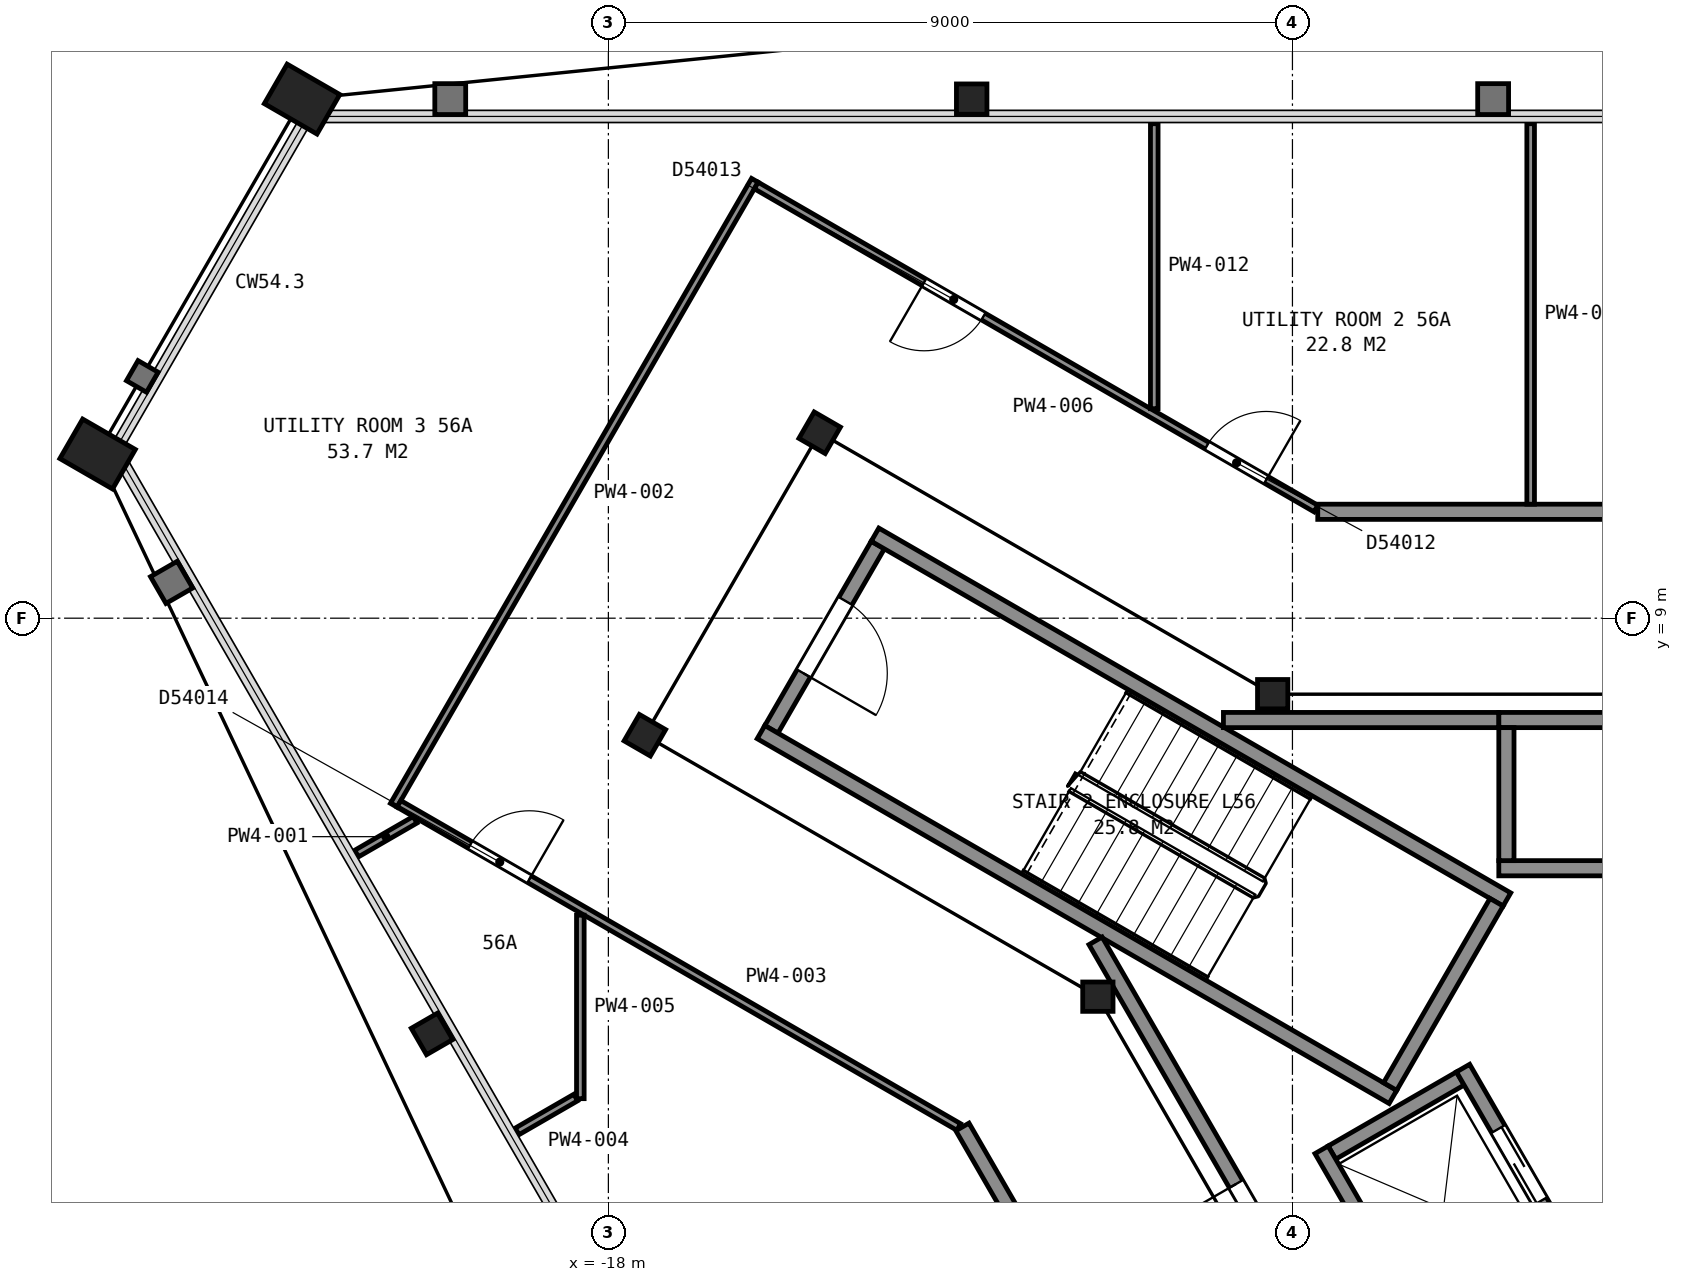
"""IFC4 building model, lengths in metres.
Left out: names, types, materials, properties, quantities, classifications, styles, units other than length and angle.
Written with IfcOpenShell. Run it as: python <this file> out.ifc"""

import sys

from ifc_helpers import new_model, si_unit, direction, frame, frame_2d, origin, origin_2d, place, context, subcontext, project, spatial, rectangle, hollow_rectangle, i_section, extrude, element, fill, save


model = new_model("IFC4")
c1 = context("Model", 3, precision=1e-05, world=origin(), true_north=direction((0.0, 1.0)))
c2 = subcontext(c1, "Body", "Model", "MODEL_VIEW")
j1 = project(units=[si_unit("LENGTHUNIT", "METRE"), si_unit("PLANEANGLEUNIT", "RADIAN")], contexts=[c1])
p1 = place(None, origin())
s1 = spatial("IfcSite", under=j1, at=p1, CompositionType="ELEMENT")
p2 = place(p1, origin())
s2 = spatial("IfcBuilding", under=s1, at=p2, CompositionType="ELEMENT")
p3 = place(p2, frame((0.0, 0.0, 224.9)))
s3 = spatial("IfcBuildingStorey", under=s2, at=p3, CompositionType="ELEMENT", Elevation=224.9)
p4 = place(p3, frame((-13.22, 15.83, 0.0), z_axis=(0.0, 0.0, 1.0), x_axis=(1.0, 0.0, 0.0)))
e1 = element("IfcColumn", 1, at=p4, inside=s3, PredefinedType="COLUMN", context=c2, shape_type="SweptSolid", body=[
    extrude(i_section(OverallWidth=0.401, OverallDepth=0.399, WebThickness=0.025, FlangeThickness=0.04, FilletRadius=0.015, at=origin_2d()), origin(), (0.0, 0.0, 1.0), 3.7),
])
for number, where, z_axis, x_axis in (
    (2, (-22.03, 15.83, 0.0), (0.0, 0.0, 1.0), (0.5, 0.866, 0.0)),
    (3, (-24.72, 11.16, 0.0), (0.0, 0.0, 1.0), (0.5, 0.866, 0.0)),
):
    element("IfcColumn", number, at=place(p3, frame(where, z_axis=z_axis, x_axis=x_axis)), inside=s3, PredefinedType="COLUMN", context=c2, shape_type="SweptSolid", body=[
        extrude(hollow_rectangle(XDim=0.6, YDim=0.8, WallThickness=0.05, at=origin_2d()), origin(), (0.0, 0.0, 1.0), 3.7),
    ])
p5 = place(p3, frame((-20.32, 3.53, 0.0), z_axis=(0.0, 0.0, 1.0), x_axis=(-0.5, 0.866025403784, 0.0)))
e4 = element("IfcColumn", 4, at=p5, inside=s3, PredefinedType="COLUMN", context=c2, shape_type="SweptSolid", body=[
    extrude(i_section(OverallWidth=0.401, OverallDepth=0.399, WebThickness=0.025, FlangeThickness=0.04, FilletRadius=0.015, at=origin_2d()), origin(), (0.0, 0.0, 1.0), 3.7),
])
p6 = place(p3, frame((-9.26, 8.0, 0.0), z_axis=(0.0, 0.0, 1.0), x_axis=(1.0, 0.0, 0.0)))
e5 = element("IfcColumn", 5, at=p6, inside=s3, PredefinedType="COLUMN", context=c2, shape_type="SweptSolid", body=[
    extrude(i_section(OverallWidth=0.399, OverallDepth=0.386, WebThickness=0.021, FlangeThickness=0.033, FilletRadius=0.015, at=origin_2d()), origin(), (0.0, 0.0, 1.0), 3.7),
])
for number, where, z_axis, x_axis in (
    (6, (-15.22, 11.44, 0.0), (0.0, 0.0, 1.0), (0.5, 0.866, 0.0)),
    (7, (-17.52, 7.46, 0.0), (0.0, 0.0, 1.0), (0.5, 0.866, 0.0)),
):
    element("IfcColumn", number, at=place(p3, frame(where, z_axis=z_axis, x_axis=x_axis)), inside=s3, PredefinedType="COLUMN", context=c2, shape_type="SweptSolid", body=[
        extrude(i_section(OverallWidth=0.401, OverallDepth=0.399, WebThickness=0.025, FlangeThickness=0.04, FilletRadius=0.015, at=origin_2d()), origin(), (0.0, 0.0, 1.0), 3.7),
    ])
p7 = place(p3, frame((-11.56, 4.02, 0.0), z_axis=(0.0, 0.0, 1.0), x_axis=(1.0, 0.0, 0.0)))
e8 = element("IfcColumn", 8, at=p7, inside=s3, PredefinedType="COLUMN", context=c2, shape_type="SweptSolid", body=[
    extrude(i_section(OverallWidth=0.399, OverallDepth=0.386, WebThickness=0.021, FlangeThickness=0.033, FilletRadius=0.015, at=origin_2d()), origin(), (0.0, 0.0, 1.0), 3.7),
])
p8 = place(p3, frame((-14.455, 9.962, 0.0), z_axis=(0.0, 0.0, 1.0), x_axis=(-0.500049511043, -0.865996816683, 0.0)))
e9 = element("IfcWall", 9, at=p8, inside=s3, PredefinedType="PARTITIONING", context=c2, shape_type="SweptSolid", body=[
    extrude(rectangle(XDim=2.8, YDim=0.2, at=frame_2d((1.4, 0.0))), origin(), (0.0, 0.0, 1.0), 3.45),
])
p9 = place(p8, frame((0.85, 0.0, 0.0)))
e10 = element("IfcOpeningElement", 10, at=p9, cuts=e9, PredefinedType="OPENING", context=c2, shape_type="SweptSolid", body=[
    extrude(rectangle(XDim=1.1, YDim=2.1, at=frame_2d((0.55, 1.05))), frame((0.0, 0.11, 0.0), z_axis=(0.0, -1.0, 0.0), x_axis=(1.0, 0.0, 0.0)), (0.0, 0.0, 1.0), 0.22),
])
for number, where, z_axis, x_axis in (
    (11, (-7.678, 2.701, 0.0), (0.0, 0.0, 1.0), (-0.866, 0.5, 0.0)),
    (12, (-6.178, 5.299, 0.0), (0.0, 0.0, 1.0), (-0.866, 0.5, 0.0)),
):
    element("IfcWall", number, at=place(p3, frame(where, z_axis=z_axis, x_axis=x_axis)), inside=s3, PredefinedType="PARTITIONING", context=c2, shape_type="SweptSolid", body=[
        extrude(rectangle(XDim=9.6, YDim=0.2, at=frame_2d((4.8, 0.0))), origin(), (0.0, 0.0, 1.0), 3.45),
    ])
p10 = place(p3, frame((-6.315, 5.262, 0.0), z_axis=(0.0, 0.0, 1.0), x_axis=(-0.500049511043, -0.865996816683, 0.0)))
e13 = element("IfcWall", 13, at=p10, inside=s3, PredefinedType="PARTITIONING", context=c2, shape_type="SweptSolid", body=[
    extrude(rectangle(XDim=2.8, YDim=0.2, at=frame_2d((1.4, 0.0))), origin(), (0.0, 0.0, 1.0), 3.45),
])
for number, where, z_axis, x_axis in (
    (14, (-6.285, 5.71, 0.0), (0.0, 0.0, 1.0), (1.0, 0.0, 0.0)),
    (15, (-6.285, 7.66, 0.0), (0.0, 0.0, 1.0), (1.0, 0.0, 0.0)),
):
    element("IfcWall", number, at=place(p3, frame(where, z_axis=z_axis, x_axis=x_axis)), inside=s3, PredefinedType="PARTITIONING", context=c2, shape_type="SweptSolid", body=[
        extrude(rectangle(XDim=2.35, YDim=0.2, at=frame_2d((1.175, 0.0))), origin(), (0.0, 0.0, 1.0), 3.7),
    ])
p11 = place(p3, frame((-8.48, 1.969, 0.0), z_axis=(0.0, 0.0, 1.0), x_axis=(0.866000020948, 0.500043961785, 0.0)))
e16 = element("IfcWall", 16, at=p11, inside=s3, PredefinedType="PARTITIONING", context=c2, shape_type="SweptSolid", body=[
    extrude(rectangle(XDim=1.95, YDim=0.2, at=frame_2d((0.975, 0.0))), origin(), (0.0, 0.0, 1.0), 3.7),
])
p12 = place(p3, frame((-6.185, 5.81, 0.0), z_axis=(0.0, 0.0, 1.0), x_axis=(0.0, 1.0, 0.0)))
e17 = element("IfcWall", 17, at=p12, inside=s3, PredefinedType="PARTITIONING", context=c2, shape_type="SweptSolid", body=[
    extrude(rectangle(XDim=1.75, YDim=0.2, at=frame_2d((0.875, 0.0))), origin(), (0.0, 0.0, 1.0), 3.7),
])
p13 = place(p3, frame((-5.28, 0.525, 0.0), z_axis=(0.0, 0.0, 1.0), x_axis=(-0.500037662692, 0.866003658127, 0.0)))
e18 = element("IfcWall", 18, at=p13, inside=s3, PredefinedType="PARTITIONING", context=c2, shape_type="SweptSolid", body=[
    extrude(rectangle(XDim=2.95, YDim=0.2, at=frame_2d((1.475, 0.0))), origin(), (0.0, 0.0, 1.0), 3.7),
])
p14 = place(p13, frame((0.925, 0.0, 0.0)))
e19 = element("IfcOpeningElement", 19, at=p14, cuts=e18, PredefinedType="OPENING", context=c2, shape_type="SweptSolid", body=[
    extrude(rectangle(XDim=1.1, YDim=2.1, at=frame_2d((0.55, 1.05))), frame((0.0, 0.11, 0.0), z_axis=(0.0, -1.0, 0.0), x_axis=(1.0, 0.0, 0.0)), (0.0, 0.0, 1.0), 0.22),
])
p15 = place(p3, frame((-7.242, -0.376, 0.0), z_axis=(0.0, 0.0, 1.0), x_axis=(-0.499996545922, 0.866027397988, 0.0)))
e20 = element("IfcWall", 20, at=p15, inside=s3, PredefinedType="PARTITIONING", context=c2, shape_type="SweptSolid", body=[
    extrude(rectangle(XDim=2.75, YDim=0.2, at=frame_2d((1.375, 0.0))), origin(), (0.0, 0.0, 1.0), 3.7),
])
p16 = place(p3, frame((-11.591, 4.755, 0.0), z_axis=(0.0, 0.0, 1.0), x_axis=(0.500043977787, -0.866000011708, 0.0)))
e21 = element("IfcWall", 21, at=p16, inside=s3, PredefinedType="PARTITIONING", context=c2, shape_type="SweptSolid", body=[
    extrude(rectangle(XDim=6.617, YDim=0.2, at=frame_2d((3.308, 0.0))), origin(), (0.0, 0.0, 1.0), 3.45),
])
p17 = place(p16, frame((3.695, 0.0, 0.0)))
e22 = element("IfcOpeningElement", 22, at=p17, cuts=e21, PredefinedType="OPENING", context=c2, shape_type="SweptSolid", body=[
    extrude(rectangle(XDim=1.8, YDim=2.1, at=frame_2d((0.9, 1.05))), frame((0.0, 0.11, 0.0), z_axis=(0.0, -1.0, 0.0), x_axis=(1.0, 0.0, 0.0)), (0.0, 0.0, 1.0), 0.22),
])
p18 = place(p3, frame((-9.908, 7.66, 0.0), z_axis=(0.0, 0.0, 1.0), x_axis=(1.0, 0.0, 0.0)))
e23 = element("IfcWall", 23, at=p18, inside=s3, PredefinedType="PARTITIONING", context=c2, shape_type="SweptSolid", body=[
    extrude(rectangle(XDim=3.621, YDim=0.2, at=frame_2d((1.811, 0.0))), origin(), (0.0, 0.0, 1.0), 3.45),
])
p19 = place(p3, frame((-21.313, 5.903, 0.0), z_axis=(0.0, 0.0, 1.0), x_axis=(0.865952303503, 0.500126592033, 0.0)))
e24 = element("IfcWall", 24, at=p19, inside=s3, PredefinedType="PARTITIONING", context=c2, shape_type="SweptSolid", body=[
    extrude(rectangle(XDim=0.889, YDim=0.1, at=frame_2d((0.444, 0.0))), origin(), (0.0, 0.0, 1.0), 2.713),
])
p20 = place(p3, frame((-20.824, 6.539, 0.0), z_axis=(0.0, 0.0, 1.0), x_axis=(0.500297300687, 0.865853689098, 0.0)))
e25 = element("IfcWall", 25, at=p20, inside=s3, PredefinedType="PARTITIONING", context=c2, shape_type="SweptSolid", body=[
    extrude(rectangle(XDim=9.496, YDim=0.1, at=frame_2d((4.748, 0.0))), origin(), (0.0, 0.0, 1.0), 2.713),
])
p21 = place(p3, frame((-13.391, 2.305, 0.0), z_axis=(0.0, 0.0, 1.0), x_axis=(-0.86606177021, 0.499937006213, 0.0)))
e26 = element("IfcWall", 26, at=p21, inside=s3, PredefinedType="PARTITIONING", context=c2, shape_type="SweptSolid", body=[
    extrude(rectangle(XDim=8.504, YDim=0.1, at=frame_2d((4.252, 0.0))), origin(), (0.0, 0.0, 1.0), 2.713),
])
p22 = place(p21, frame((6.522, 0.0, 0.0)))
e27 = element("IfcOpeningElement", 27, at=p22, cuts=e26, PredefinedType="OPENING", context=c2, shape_type="SweptSolid", body=[
    extrude(rectangle(XDim=0.9, YDim=2.1, at=frame_2d((0.45, 1.05))), frame((0.0, 0.06, 0.0), z_axis=(0.0, -1.0, 0.0), x_axis=(1.0, 0.0, 0.0)), (0.0, 0.0, 1.0), 0.12),
])
p23 = place(p3, frame((-19.202, 2.247, 0.0), z_axis=(0.0, 0.0, 1.0), x_axis=(0.86604424267, 0.499967368674, 0.0)))
e28 = element("IfcWall", 28, at=p23, inside=s3, PredefinedType="PARTITIONING", context=c2, shape_type="SweptSolid", body=[
    extrude(rectangle(XDim=0.892, YDim=0.1, at=frame_2d((0.446, 0.0))), origin(), (0.0, 0.0, 1.0), 2.713),
])
p24 = place(p3, frame((-18.369, 2.678, 0.0), z_axis=(0.0, 0.0, 1.0), x_axis=(0.0, 1.0, 0.0)))
e29 = element("IfcWall", 29, at=p24, inside=s3, PredefinedType="PARTITIONING", context=c2, shape_type="SweptSolid", body=[
    extrude(rectangle(XDim=2.414, YDim=0.1, at=frame_2d((1.207, 0.0))), origin(), (0.0, 0.0, 1.0), 2.713),
])
p25 = place(p3, frame((-16.055, 14.693, 0.0), z_axis=(0.0, 0.0, 1.0), x_axis=(0.866070360466, -0.499922124658, 0.0)))
e30 = element("IfcWall", 30, at=p25, inside=s3, PredefinedType="PARTITIONING", context=c2, shape_type="SweptSolid", body=[
    extrude(rectangle(XDim=8.503, YDim=0.1, at=frame_2d((4.251, 0.0))), origin(), (0.0, 0.0, 1.0), 2.713),
])
p26 = place(p25, frame((6.847, 0.0, 0.0)))
e31 = element("IfcOpeningElement", 31, at=p26, cuts=e30, PredefinedType="OPENING", context=c2, shape_type="SweptSolid", body=[
    extrude(rectangle(XDim=0.9, YDim=2.1, at=frame_2d((0.45, 1.05))), frame((0.0, 0.06, 0.0), z_axis=(0.0, -1.0, 0.0), x_axis=(1.0, 0.0, 0.0)), (0.0, 0.0, 1.0), 0.12),
])
p27 = place(p25, frame((2.55, 0.0, 0.0)))
e32 = element("IfcOpeningElement", 32, at=p27, cuts=e30, PredefinedType="OPENING", context=c2, shape_type="SweptSolid", body=[
    extrude(rectangle(XDim=0.9, YDim=2.1, at=frame_2d((0.45, 1.05))), frame((0.0, 0.06, 0.0), z_axis=(0.0, -1.0, 0.0), x_axis=(1.0, 0.0, 0.0)), (0.0, 0.0, 1.0), 0.12),
])
p28 = place(p3, frame((-4.675, -12.706, 0.0), z_axis=(0.0, 0.0, 1.0), x_axis=(-0.49997440863, 0.866040178465, 0.0)))
e33 = element("IfcWall", 33, at=p28, inside=s3, PredefinedType="PARTITIONING", context=c2, shape_type="SweptSolid", body=[
    extrude(rectangle(XDim=17.335, YDim=0.2, at=frame_2d((8.667, 0.0))), origin(), (0.0, 0.0, 1.0), 2.713),
])
p29 = place(p28, frame((14.185, 0.0, 0.0)))
e34 = element("IfcOpeningElement", 34, at=p29, cuts=e33, PredefinedType="OPENING", context=c2, shape_type="SweptSolid", body=[
    extrude(rectangle(XDim=0.9, YDim=2.1, at=frame_2d((0.45, 1.05))), frame((0.0, 0.11, 0.0), z_axis=(0.0, -1.0, 0.0), x_axis=(1.0, 0.0, 0.0)), (0.0, 0.0, 1.0), 0.22),
])
p30 = place(p28, frame((6.895, 0.0, 0.0)))
e35 = element("IfcOpeningElement", 35, at=p30, cuts=e33, PredefinedType="OPENING", context=c2, shape_type="SweptSolid", body=[
    extrude(rectangle(XDim=0.9, YDim=2.1, at=frame_2d((0.45, 1.05))), frame((0.0, 0.11, 0.0), z_axis=(0.0, -1.0, 0.0), x_axis=(1.0, 0.0, 0.0)), (0.0, 0.0, 1.0), 0.22),
])
p31 = place(p28, frame((1.979, 0.0, 0.0)))
e36 = element("IfcOpeningElement", 36, at=p31, cuts=e33, PredefinedType="OPENING", context=c2, shape_type="SweptSolid", body=[
    extrude(rectangle(XDim=0.9, YDim=2.1, at=frame_2d((0.45, 1.05))), frame((0.0, 0.11, 0.0), z_axis=(0.0, -1.0, 0.0), x_axis=(1.0, 0.0, 0.0)), (0.0, 0.0, 1.0), 0.22),
])
p32 = place(p3, frame((-10.818, 11.757, 0.0), z_axis=(0.0, 0.0, 1.0), x_axis=(0.0, 1.0, 0.0)))
e37 = element("IfcWall", 37, at=p32, inside=s3, PredefinedType="PARTITIONING", context=c2, shape_type="SweptSolid", body=[
    extrude(rectangle(XDim=3.75, YDim=0.1, at=frame_2d((1.875, 0.0))), origin(), (0.0, 0.0, 1.0), 2.713),
])
p33 = place(p3, frame((-8.667, 10.4, 0.0), z_axis=(0.0, 0.0, 1.0), x_axis=(1.0, 0.0, 0.0)))
e38 = element("IfcWall", 38, at=p33, inside=s3, PredefinedType="PARTITIONING", context=c2, shape_type="SweptSolid", body=[
    extrude(rectangle(XDim=17.334, YDim=0.2, at=frame_2d((8.667, 0.0))), origin(), (0.0, 0.0, 1.0), 2.713),
])
p34 = place(p33, frame((9.252, 0.0, 0.0)))
e39 = element("IfcOpeningElement", 39, at=p34, cuts=e38, PredefinedType="OPENING", context=c2, shape_type="SweptSolid", body=[
    extrude(rectangle(XDim=0.9, YDim=2.1, at=frame_2d((0.45, 1.05))), frame((0.0, 0.11, 0.0), z_axis=(0.0, -1.0, 0.0), x_axis=(1.0, 0.0, 0.0)), (0.0, 0.0, 1.0), 0.22),
])
p35 = place(p33, frame((4.851, 0.0, 0.0)))
e40 = element("IfcOpeningElement", 40, at=p35, cuts=e38, PredefinedType="OPENING", context=c2, shape_type="SweptSolid", body=[
    extrude(rectangle(XDim=0.9, YDim=2.1, at=frame_2d((0.45, 1.05))), frame((0.0, 0.11, 0.0), z_axis=(0.0, -1.0, 0.0), x_axis=(1.0, 0.0, 0.0)), (0.0, 0.0, 1.0), 0.22),
])
p36 = place(p3, frame((-5.866, 10.5, 0.0), z_axis=(0.0, 0.0, 1.0), x_axis=(0.0, 1.0, 0.0)))
e41 = element("IfcWall", 41, at=p36, inside=s3, PredefinedType="PARTITIONING", context=c2, shape_type="SweptSolid", body=[
    extrude(rectangle(XDim=5.006, YDim=0.1, at=frame_2d((2.503, 0.0))), origin(), (0.0, 0.0, 1.0), 2.713),
])
p37 = place(p9, origin())
e42 = element("IfcDoor", 42, at=p37, inside=s3, OperationType="SINGLE_SWING_RIGHT", PredefinedType="DOOR", context=c2, shape_type="SweptSolid", body=[
    extrude(rectangle(XDim=1.1, YDim=2.1, at=frame_2d((0.55, 1.05))), frame((0.0, 0.025, 0.0), z_axis=(0.0, -1.0, 0.0), x_axis=(1.0, 0.0, 0.0)), (0.0, 0.0, 1.0), 0.05),
])
fill(e10, e42)
p38 = place(p14, origin())
e43 = element("IfcDoor", 43, at=p38, inside=s3, OperationType="SLIDING_TO_LEFT", PredefinedType="DOOR", context=c2, shape_type="SweptSolid", body=[
    extrude(rectangle(XDim=1.1, YDim=2.1, at=frame_2d((0.55, 1.05))), frame((0.0, 0.025, 0.0), z_axis=(0.0, -1.0, 0.0), x_axis=(1.0, 0.0, 0.0)), (0.0, 0.0, 1.0), 0.05),
])
fill(e19, e43)
p39 = place(p17, origin())
e44 = element("IfcDoor", 44, at=p39, inside=s3, OperationType="DOUBLE_DOOR_SINGLE_SWING", PredefinedType="DOOR", context=c2, shape_type="SweptSolid", body=[
    extrude(rectangle(XDim=1.8, YDim=2.1, at=frame_2d((0.9, 1.05))), frame((0.0, 0.025, 0.0), z_axis=(0.0, -1.0, 0.0), x_axis=(1.0, 0.0, 0.0)), (0.0, 0.0, 1.0), 0.05),
])
fill(e22, e44)
p40 = place(p22, origin())
e45 = element("IfcDoor", 45, at=p40, inside=s3, OperationType="SINGLE_SWING_LEFT", PredefinedType="DOOR", context=c2, shape_type="SweptSolid", body=[
    extrude(rectangle(XDim=0.9, YDim=2.1, at=frame_2d((0.45, 1.05))), frame((0.0, 0.025, 0.0), z_axis=(0.0, -1.0, 0.0), x_axis=(1.0, 0.0, 0.0)), (0.0, 0.0, 1.0), 0.05),
])
fill(e27, e45)
p41 = place(p26, origin())
e46 = element("IfcDoor", 46, at=p41, inside=s3, OperationType="SINGLE_SWING_RIGHT", PredefinedType="DOOR", context=c2, shape_type="SweptSolid", body=[
    extrude(rectangle(XDim=0.9, YDim=2.1, at=frame_2d((0.45, 1.05))), frame((0.0, 0.025, 0.0), z_axis=(0.0, -1.0, 0.0), x_axis=(1.0, 0.0, 0.0)), (0.0, 0.0, 1.0), 0.05),
])
fill(e31, e46)
p42 = place(p27, origin())
e47 = element("IfcDoor", 47, at=p42, inside=s3, OperationType="SINGLE_SWING_LEFT", PredefinedType="DOOR", context=c2, shape_type="SweptSolid", body=[
    extrude(rectangle(XDim=0.9, YDim=2.1, at=frame_2d((0.45, 1.05))), frame((0.0, 0.025, 0.0), z_axis=(0.0, -1.0, 0.0), x_axis=(1.0, 0.0, 0.0)), (0.0, 0.0, 1.0), 0.05),
])
fill(e32, e47)
save(model, sys.argv[1])
